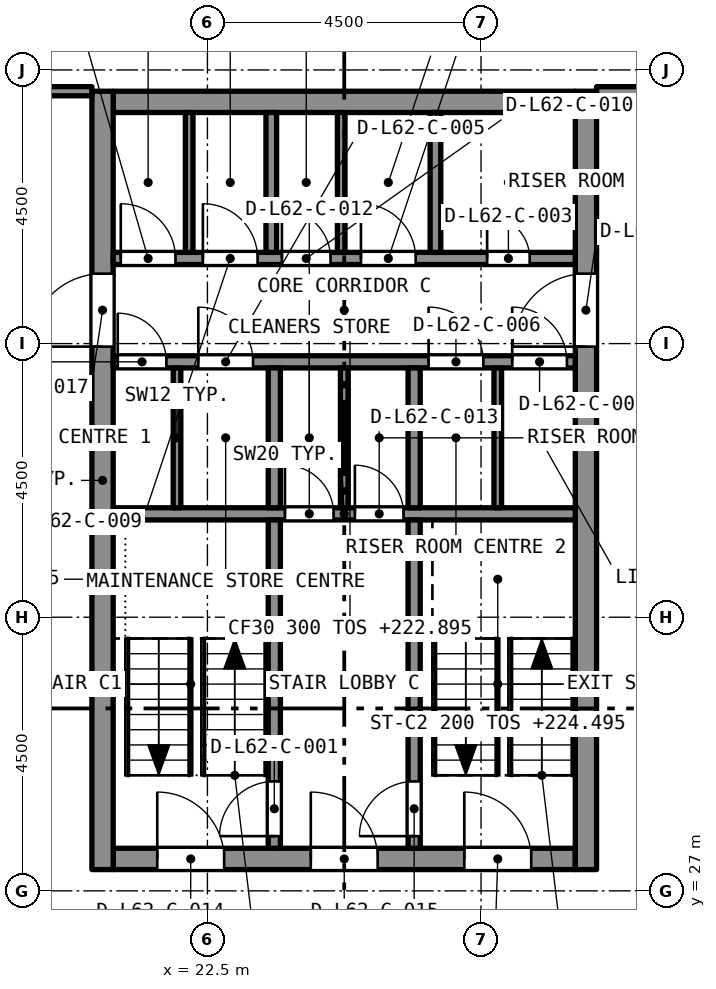
"""IFC4 building model, lengths in metres.
Left out: names, types, materials, properties, quantities, classifications, styles, units other than length and angle.
Written with IfcOpenShell. Run it as: python <this file> out.ifc"""

import sys

from ifc_helpers import new_model, si_unit, direction, frame, frame_2d, origin, place, context, subcontext, project, spatial, rectangle, extrude, element, fill, save


model = new_model("IFC4")
c1 = context("Model", 3, precision=1e-05, world=origin(), true_north=direction((0.0, 1.0)))
c2 = subcontext(c1, "Body", "Model", "MODEL_VIEW")
j1 = project(units=[si_unit("LENGTHUNIT", "METRE"), si_unit("PLANEANGLEUNIT", "RADIAN")], contexts=[c1])
p1 = place(None, origin())
s1 = spatial("IfcSite", under=j1, at=p1, CompositionType="ELEMENT")
p2 = place(p1, origin())
s2 = spatial("IfcBuilding", under=s1, at=p2, CompositionType="ELEMENT")
p3 = place(p2, frame((0.0, 0.0, 222.895)))
s3 = spatial("IfcBuildingStorey", under=s2, at=p3, CompositionType="ELEMENT", Elevation=222.895)
p4 = place(p3, frame((20.95, 27.525, 0.0), z_axis=(0.0, 0.0, 1.0), x_axis=(1.0, 0.0, 0.0)))
e1 = element("IfcWall", 1, at=p4, inside=s3, PredefinedType="SOLIDWALL", context=c2, shape_type="SweptSolid", body=[
    extrude(rectangle(XDim=7.6, YDim=0.35, at=frame_2d((3.8, 0.0))), origin(), (0.0, 0.0, 1.0), 3.2),
])
p5 = place(p4, frame((0.725, 0.0, 0.0)))
e2 = element("IfcOpeningElement", 2, at=p5, cuts=e1, PredefinedType="OPENING", context=c2, shape_type="SweptSolid", body=[
    extrude(rectangle(XDim=1.1, YDim=2.1, at=frame_2d((0.55, 1.05))), frame((0.0, 0.185, 0.0), z_axis=(0.0, -1.0, 0.0), x_axis=(1.0, 0.0, 0.0)), (0.0, 0.0, 1.0), 0.37),
])
p6 = place(p4, frame((3.25, 0.0, 0.0)))
e3 = element("IfcOpeningElement", 3, at=p6, cuts=e1, PredefinedType="OPENING", context=c2, shape_type="SweptSolid", body=[
    extrude(rectangle(XDim=1.1, YDim=2.1, at=frame_2d((0.55, 1.05))), frame((0.0, 0.185, 0.0), z_axis=(0.0, -1.0, 0.0), x_axis=(1.0, 0.0, 0.0)), (0.0, 0.0, 1.0), 0.37),
])
p7 = place(p4, frame((5.775, 0.0, 0.0)))
e4 = element("IfcOpeningElement", 4, at=p7, cuts=e1, PredefinedType="OPENING", context=c2, shape_type="SweptSolid", body=[
    extrude(rectangle(XDim=1.1, YDim=2.1, at=frame_2d((0.55, 1.05))), frame((0.0, 0.185, 0.0), z_axis=(0.0, -1.0, 0.0), x_axis=(1.0, 0.0, 0.0)), (0.0, 0.0, 1.0), 0.37),
])
p8 = place(p3, frame((20.95, 39.975, 0.0), z_axis=(0.0, 0.0, 1.0), x_axis=(1.0, 0.0, 0.0)))
e5 = element("IfcWall", 5, at=p8, inside=s3, PredefinedType="SOLIDWALL", context=c2, shape_type="SweptSolid", body=[
    extrude(rectangle(XDim=7.6, YDim=0.35, at=frame_2d((3.8, 0.0))), origin(), (0.0, 0.0, 1.0), 3.2),
])
p9 = place(p3, frame((20.775, 27.35, 0.0), z_axis=(0.0, 0.0, 1.0), x_axis=(0.0, 1.0, 0.0)))
e6 = element("IfcWall", 6, at=p9, inside=s3, PredefinedType="SOLIDWALL", context=c2, shape_type="SweptSolid", body=[
    extrude(rectangle(XDim=12.8, YDim=0.35, at=frame_2d((6.4, 0.0))), origin(), (0.0, 0.0, 1.0), 3.2),
])
p10 = place(p9, frame((8.6, 0.0, 0.0)))
e7 = element("IfcOpeningElement", 7, at=p10, cuts=e6, PredefinedType="OPENING", context=c2, shape_type="SweptSolid", body=[
    extrude(rectangle(XDim=1.2, YDim=2.1, at=frame_2d((0.6, 1.05))), frame((0.0, 0.185, 0.0), z_axis=(0.0, -1.0, 0.0), x_axis=(1.0, 0.0, 0.0)), (0.0, 0.0, 1.0), 0.37),
])
p11 = place(p3, frame((28.725, 27.35, 0.0), z_axis=(0.0, 0.0, 1.0), x_axis=(0.0, 1.0, 0.0)))
e8 = element("IfcWall", 8, at=p11, inside=s3, PredefinedType="SOLIDWALL", context=c2, shape_type="SweptSolid", body=[
    extrude(rectangle(XDim=12.8, YDim=0.35, at=frame_2d((6.4, 0.0))), origin(), (0.0, 0.0, 1.0), 3.2),
])
p12 = place(p11, frame((8.6, 0.0, 0.0)))
e9 = element("IfcOpeningElement", 9, at=p12, cuts=e8, PredefinedType="OPENING", context=c2, shape_type="SweptSolid", body=[
    extrude(rectangle(XDim=1.2, YDim=2.1, at=frame_2d((0.6, 1.05))), frame((0.0, 0.185, 0.0), z_axis=(0.0, -1.0, 0.0), x_axis=(1.0, 0.0, 0.0)), (0.0, 0.0, 1.0), 0.37),
])
p13 = place(p3, frame((18.4, 40.15, 0.0), z_axis=(0.0, 0.0, 1.0), x_axis=(1.0, 0.0, 0.0)))
e10 = element("IfcWall", 10, at=p13, inside=s3, PredefinedType="PARTITIONING", context=c2, shape_type="SweptSolid", body=[
    extrude(rectangle(XDim=2.2, YDim=0.15, at=frame_2d((1.1, 0.0))), origin(), (0.0, 0.0, 1.0), 2.75),
])
p14 = place(p13, frame((0.2, 0.0, 0.0)))
e11 = element("IfcOpeningElement", 11, at=p14, cuts=e10, PredefinedType="OPENING", context=c2, shape_type="SweptSolid", body=[
    extrude(rectangle(XDim=1.0, YDim=2.1, at=frame_2d((0.5, 1.05))), frame((0.0, 0.085, 0.0), z_axis=(0.0, -1.0, 0.0), x_axis=(1.0, 0.0, 0.0)), (0.0, 0.0, 1.0), 0.17),
])
p15 = place(p3, frame((28.9, 40.15, 0.0), z_axis=(0.0, 0.0, 1.0), x_axis=(1.0, 0.0, 0.0)))
e12 = element("IfcWall", 12, at=p15, inside=s3, PredefinedType="PARTITIONING", context=c2, shape_type="SweptSolid", body=[
    extrude(rectangle(XDim=2.2, YDim=0.15, at=frame_2d((1.1, 0.0))), origin(), (0.0, 0.0, 1.0), 2.75),
])
p16 = place(p3, frame((20.95, 33.2, 0.0), z_axis=(0.0, 0.0, 1.0), x_axis=(1.0, 0.0, 0.0)))
e13 = element("IfcWall", 13, at=p16, inside=s3, PredefinedType="SOLIDWALL", context=c2, shape_type="SweptSolid", body=[
    extrude(rectangle(XDim=7.6, YDim=0.2, at=frame_2d((3.8, 0.0))), origin(), (0.0, 0.0, 1.0), 2.9),
])
p17 = place(p16, frame((2.825, 0.0, 0.0)))
e14 = element("IfcOpeningElement", 14, at=p17, cuts=e13, PredefinedType="OPENING", context=c2, shape_type="SweptSolid", body=[
    extrude(rectangle(XDim=0.8, YDim=2.1, at=frame_2d((0.4, 1.05))), frame((0.0, 0.11, 0.0), z_axis=(0.0, -1.0, 0.0), x_axis=(1.0, 0.0, 0.0)), (0.0, 0.0, 1.0), 0.22),
])
p18 = place(p16, frame((3.975, 0.0, 0.0)))
e15 = element("IfcOpeningElement", 15, at=p18, cuts=e13, PredefinedType="OPENING", context=c2, shape_type="SweptSolid", body=[
    extrude(rectangle(XDim=0.8, YDim=2.1, at=frame_2d((0.4, 1.05))), frame((0.0, 0.11, 0.0), z_axis=(0.0, -1.0, 0.0), x_axis=(1.0, 0.0, 0.0)), (0.0, 0.0, 1.0), 0.22),
])
p19 = place(p3, frame((20.95, 35.7, 0.0), z_axis=(0.0, 0.0, 1.0), x_axis=(1.0, 0.0, 0.0)))
e16 = element("IfcWall", 16, at=p19, inside=s3, PredefinedType="SOLIDWALL", context=c2, shape_type="SweptSolid", body=[
    extrude(rectangle(XDim=7.6, YDim=0.2, at=frame_2d((3.8, 0.0))), origin(), (0.0, 0.0, 1.0), 2.9),
])
p20 = place(p19, frame((0.075, 0.0, 0.0)))
e17 = element("IfcOpeningElement", 17, at=p20, cuts=e16, PredefinedType="OPENING", context=c2, shape_type="SweptSolid", body=[
    extrude(rectangle(XDim=0.8, YDim=2.1, at=frame_2d((0.4, 1.05))), frame((0.0, 0.11, 0.0), z_axis=(0.0, -1.0, 0.0), x_axis=(1.0, 0.0, 0.0)), (0.0, 0.0, 1.0), 0.22),
])
p21 = place(p19, frame((1.4, 0.0, 0.0)))
e18 = element("IfcOpeningElement", 18, at=p21, cuts=e16, PredefinedType="OPENING", context=c2, shape_type="SweptSolid", body=[
    extrude(rectangle(XDim=0.9, YDim=2.1, at=frame_2d((0.45, 1.05))), frame((0.0, 0.11, 0.0), z_axis=(0.0, -1.0, 0.0), x_axis=(1.0, 0.0, 0.0)), (0.0, 0.0, 1.0), 0.22),
])
p22 = place(p19, frame((5.188, 0.0, 0.0)))
e19 = element("IfcOpeningElement", 19, at=p22, cuts=e16, PredefinedType="OPENING", context=c2, shape_type="SweptSolid", body=[
    extrude(rectangle(XDim=0.9, YDim=2.1, at=frame_2d((0.45, 1.05))), frame((0.0, 0.11, 0.0), z_axis=(0.0, -1.0, 0.0), x_axis=(1.0, 0.0, 0.0)), (0.0, 0.0, 1.0), 0.22),
])
p23 = place(p19, frame((6.562, 0.0, 0.0)))
e20 = element("IfcOpeningElement", 20, at=p23, cuts=e16, PredefinedType="OPENING", context=c2, shape_type="SweptSolid", body=[
    extrude(rectangle(XDim=0.9, YDim=2.1, at=frame_2d((0.45, 1.05))), frame((0.0, 0.11, 0.0), z_axis=(0.0, -1.0, 0.0), x_axis=(1.0, 0.0, 0.0)), (0.0, 0.0, 1.0), 0.22),
])
p24 = place(p3, frame((20.95, 37.4, 0.0), z_axis=(0.0, 0.0, 1.0), x_axis=(1.0, 0.0, 0.0)))
e21 = element("IfcWall", 21, at=p24, inside=s3, PredefinedType="SOLIDWALL", context=c2, shape_type="SweptSolid", body=[
    extrude(rectangle(XDim=7.6, YDim=0.2, at=frame_2d((3.8, 0.0))), origin(), (0.0, 0.0, 1.0), 2.9),
])
p25 = place(p24, frame((6.15, 0.0, 0.0)))
e22 = element("IfcOpeningElement", 22, at=p25, cuts=e21, PredefinedType="OPENING", context=c2, shape_type="SweptSolid", body=[
    extrude(rectangle(XDim=0.7, YDim=2.1, at=frame_2d((0.35, 1.05))), frame((0.0, 0.11, 0.0), z_axis=(0.0, -1.0, 0.0), x_axis=(1.0, 0.0, 0.0)), (0.0, 0.0, 1.0), 0.22),
])
p26 = place(p24, frame((0.125, 0.0, 0.0)))
e23 = element("IfcOpeningElement", 23, at=p26, cuts=e21, PredefinedType="OPENING", context=c2, shape_type="SweptSolid", body=[
    extrude(rectangle(XDim=0.9, YDim=2.1, at=frame_2d((0.45, 1.05))), frame((0.0, 0.11, 0.0), z_axis=(0.0, -1.0, 0.0), x_axis=(1.0, 0.0, 0.0)), (0.0, 0.0, 1.0), 0.22),
])
p27 = place(p24, frame((1.475, 0.0, 0.0)))
e24 = element("IfcOpeningElement", 24, at=p27, cuts=e21, PredefinedType="OPENING", context=c2, shape_type="SweptSolid", body=[
    extrude(rectangle(XDim=0.9, YDim=2.1, at=frame_2d((0.45, 1.05))), frame((0.0, 0.11, 0.0), z_axis=(0.0, -1.0, 0.0), x_axis=(1.0, 0.0, 0.0)), (0.0, 0.0, 1.0), 0.22),
])
p28 = place(p24, frame((2.775, 0.0, 0.0)))
e25 = element("IfcOpeningElement", 25, at=p28, cuts=e21, PredefinedType="OPENING", context=c2, shape_type="SweptSolid", body=[
    extrude(rectangle(XDim=0.8, YDim=2.1, at=frame_2d((0.4, 1.05))), frame((0.0, 0.11, 0.0), z_axis=(0.0, -1.0, 0.0), x_axis=(1.0, 0.0, 0.0)), (0.0, 0.0, 1.0), 0.22),
])
p29 = place(p24, frame((4.075, 0.0, 0.0)))
e26 = element("IfcOpeningElement", 26, at=p29, cuts=e21, PredefinedType="OPENING", context=c2, shape_type="SweptSolid", body=[
    extrude(rectangle(XDim=0.9, YDim=2.1, at=frame_2d((0.45, 1.05))), frame((0.0, 0.11, 0.0), z_axis=(0.0, -1.0, 0.0), x_axis=(1.0, 0.0, 0.0)), (0.0, 0.0, 1.0), 0.22),
])
p30 = place(p3, frame((23.6, 27.7, 0.0), z_axis=(0.0, 0.0, 1.0), x_axis=(0.0, 1.0, 0.0)))
e27 = element("IfcWall", 27, at=p30, inside=s3, PredefinedType="SOLIDWALL", context=c2, shape_type="SweptSolid", body=[
    extrude(rectangle(XDim=5.4, YDim=0.2, at=frame_2d((2.7, 0.0))), origin(), (0.0, 0.0, 1.0), 2.9),
])
p31 = place(p30, frame((0.2, 0.0, 0.0)))
e28 = element("IfcOpeningElement", 28, at=p31, cuts=e27, PredefinedType="OPENING", context=c2, shape_type="SweptSolid", body=[
    extrude(rectangle(XDim=0.9, YDim=2.1, at=frame_2d((0.45, 1.05))), frame((0.0, 0.11, 0.0), z_axis=(0.0, -1.0, 0.0), x_axis=(1.0, 0.0, 0.0)), (0.0, 0.0, 1.0), 0.22),
])
p32 = place(p3, frame((25.9, 27.7, 0.0), z_axis=(0.0, 0.0, 1.0), x_axis=(0.0, 1.0, 0.0)))
e29 = element("IfcWall", 29, at=p32, inside=s3, PredefinedType="SOLIDWALL", context=c2, shape_type="SweptSolid", body=[
    extrude(rectangle(XDim=5.4, YDim=0.2, at=frame_2d((2.7, 0.0))), origin(), (0.0, 0.0, 1.0), 2.9),
])
p33 = place(p32, frame((0.2, 0.0, 0.0)))
e30 = element("IfcOpeningElement", 30, at=p33, cuts=e29, PredefinedType="OPENING", context=c2, shape_type="SweptSolid", body=[
    extrude(rectangle(XDim=0.9, YDim=2.1, at=frame_2d((0.45, 1.05))), frame((0.0, 0.11, 0.0), z_axis=(0.0, -1.0, 0.0), x_axis=(1.0, 0.0, 0.0)), (0.0, 0.0, 1.0), 0.22),
])
for number, where, z_axis, x_axis in (
    (31, (23.6, 33.3, 0.0), (0.0, 0.0, 1.0), (0.0, 1.0, 0.0)),
    (32, (25.9, 33.3, 0.0), (0.0, 0.0, 1.0), (0.0, 1.0, 0.0)),
):
    element("IfcWall", number, at=place(p3, frame(where, z_axis=z_axis, x_axis=x_axis)), inside=s3, PredefinedType="SOLIDWALL", context=c2, shape_type="SweptSolid", body=[
        extrude(rectangle(XDim=2.3, YDim=0.2, at=frame_2d((1.15, 0.0))), origin(), (0.0, 0.0, 1.0), 2.9),
    ])
for number, where, z_axis, x_axis in (
    (33, (23.55, 37.5, 0.0), (0.0, 0.0, 1.0), (0.0, 1.0, 0.0)),
    (34, (26.25, 37.5, 0.0), (0.0, 0.0, 1.0), (0.0, 1.0, 0.0)),
):
    element("IfcWall", number, at=place(p3, frame(where, z_axis=z_axis, x_axis=x_axis)), inside=s3, PredefinedType="SOLIDWALL", context=c2, shape_type="SweptSolid", body=[
        extrude(rectangle(XDim=2.3, YDim=0.175, at=frame_2d((1.15, 0.0))), origin(), (0.0, 0.0, 1.0), 2.9),
    ])
for number, where, z_axis, x_axis in (
    (35, (22.0, 33.3, 0.0), (0.0, 0.0, 1.0), (0.0, 1.0, 0.0)),
    (36, (27.275, 33.3, 0.0), (0.0, 0.0, 1.0), (0.0, 1.0, 0.0)),
    (37, (22.2, 37.5, 0.0), (0.0, 0.0, 1.0), (0.0, 1.0, 0.0)),
    (38, (24.7, 37.5, 0.0), (0.0, 0.0, 1.0), (0.0, 1.0, 0.0)),
    (39, (24.75, 33.3, 0.0), (0.0, 0.0, 1.0), (0.0, 1.0, 0.0)),
):
    element("IfcWall", number, at=place(p3, frame(where, z_axis=z_axis, x_axis=x_axis)), inside=s3, PredefinedType="PARTITIONING", context=c2, shape_type="SweptSolid", body=[
        extrude(rectangle(XDim=2.3, YDim=0.125, at=frame_2d((1.15, 0.0))), origin(), (0.0, 0.0, 1.0), 2.9),
    ])
p34 = place(p31, origin())
e40 = element("IfcDoor", 40, at=p34, inside=s3, OperationType="SINGLE_SWING_LEFT", PredefinedType="DOOR", context=c2, shape_type="SweptSolid", body=[
    extrude(rectangle(XDim=0.9, YDim=2.1, at=frame_2d((0.45, 1.05))), frame((0.0, 0.025, 0.0), z_axis=(0.0, -1.0, 0.0), x_axis=(1.0, 0.0, 0.0)), (0.0, 0.0, 1.0), 0.05),
])
fill(e28, e40)
p35 = place(p33, origin())
e41 = element("IfcDoor", 41, at=p35, inside=s3, OperationType="SINGLE_SWING_LEFT", PredefinedType="DOOR", context=c2, shape_type="SweptSolid", body=[
    extrude(rectangle(XDim=0.9, YDim=2.1, at=frame_2d((0.45, 1.05))), frame((0.0, 0.025, 0.0), z_axis=(0.0, -1.0, 0.0), x_axis=(1.0, 0.0, 0.0)), (0.0, 0.0, 1.0), 0.05),
])
fill(e30, e41)
p36 = place(p25, origin())
e42 = element("IfcDoor", 42, at=p36, inside=s3, OperationType="SINGLE_SWING_LEFT", PredefinedType="DOOR", context=c2, shape_type="SweptSolid", body=[
    extrude(rectangle(XDim=0.7, YDim=2.1, at=frame_2d((0.35, 1.05))), frame((0.0, 0.025, 0.0), z_axis=(0.0, -1.0, 0.0), x_axis=(1.0, 0.0, 0.0)), (0.0, 0.0, 1.0), 0.05),
])
fill(e22, e42)
p37 = place(p20, origin())
e43 = element("IfcDoor", 43, at=p37, inside=s3, OperationType="SINGLE_SWING_LEFT", PredefinedType="DOOR", context=c2, shape_type="SweptSolid", body=[
    extrude(rectangle(XDim=0.8, YDim=2.1, at=frame_2d((0.4, 1.05))), frame((0.0, 0.025, 0.0), z_axis=(0.0, -1.0, 0.0), x_axis=(1.0, 0.0, 0.0)), (0.0, 0.0, 1.0), 0.05),
])
fill(e17, e43)
p38 = place(p21, origin())
e44 = element("IfcDoor", 44, at=p38, inside=s3, OperationType="SINGLE_SWING_LEFT", PredefinedType="DOOR", context=c2, shape_type="SweptSolid", body=[
    extrude(rectangle(XDim=0.9, YDim=2.1, at=frame_2d((0.45, 1.05))), frame((0.0, 0.025, 0.0), z_axis=(0.0, -1.0, 0.0), x_axis=(1.0, 0.0, 0.0)), (0.0, 0.0, 1.0), 0.05),
])
fill(e18, e44)
p39 = place(p22, origin())
e45 = element("IfcDoor", 45, at=p39, inside=s3, OperationType="SINGLE_SWING_LEFT", PredefinedType="DOOR", context=c2, shape_type="SweptSolid", body=[
    extrude(rectangle(XDim=0.9, YDim=2.1, at=frame_2d((0.45, 1.05))), frame((0.0, 0.025, 0.0), z_axis=(0.0, -1.0, 0.0), x_axis=(1.0, 0.0, 0.0)), (0.0, 0.0, 1.0), 0.05),
])
fill(e19, e45)
p40 = place(p23, origin())
e46 = element("IfcDoor", 46, at=p40, inside=s3, OperationType="SINGLE_SWING_LEFT", PredefinedType="DOOR", context=c2, shape_type="SweptSolid", body=[
    extrude(rectangle(XDim=0.9, YDim=2.1, at=frame_2d((0.45, 1.05))), frame((0.0, 0.025, 0.0), z_axis=(0.0, -1.0, 0.0), x_axis=(1.0, 0.0, 0.0)), (0.0, 0.0, 1.0), 0.05),
])
fill(e20, e46)
p41 = place(p26, origin())
e47 = element("IfcDoor", 47, at=p41, inside=s3, OperationType="SINGLE_SWING_LEFT", PredefinedType="DOOR", context=c2, shape_type="SweptSolid", body=[
    extrude(rectangle(XDim=0.9, YDim=2.1, at=frame_2d((0.45, 1.05))), frame((0.0, 0.025, 0.0), z_axis=(0.0, -1.0, 0.0), x_axis=(1.0, 0.0, 0.0)), (0.0, 0.0, 1.0), 0.05),
])
fill(e23, e47)
p42 = place(p27, origin())
e48 = element("IfcDoor", 48, at=p42, inside=s3, OperationType="SINGLE_SWING_LEFT", PredefinedType="DOOR", context=c2, shape_type="SweptSolid", body=[
    extrude(rectangle(XDim=0.9, YDim=2.1, at=frame_2d((0.45, 1.05))), frame((0.0, 0.025, 0.0), z_axis=(0.0, -1.0, 0.0), x_axis=(1.0, 0.0, 0.0)), (0.0, 0.0, 1.0), 0.05),
])
fill(e24, e48)
p43 = place(p28, origin())
e49 = element("IfcDoor", 49, at=p43, inside=s3, OperationType="SINGLE_SWING_LEFT", PredefinedType="DOOR", context=c2, shape_type="SweptSolid", body=[
    extrude(rectangle(XDim=0.8, YDim=2.1, at=frame_2d((0.4, 1.05))), frame((0.0, 0.025, 0.0), z_axis=(0.0, -1.0, 0.0), x_axis=(1.0, 0.0, 0.0)), (0.0, 0.0, 1.0), 0.05),
])
fill(e25, e49)
p44 = place(p29, origin())
e50 = element("IfcDoor", 50, at=p44, inside=s3, OperationType="SINGLE_SWING_LEFT", PredefinedType="DOOR", context=c2, shape_type="SweptSolid", body=[
    extrude(rectangle(XDim=0.9, YDim=2.1, at=frame_2d((0.45, 1.05))), frame((0.0, 0.025, 0.0), z_axis=(0.0, -1.0, 0.0), x_axis=(1.0, 0.0, 0.0)), (0.0, 0.0, 1.0), 0.05),
])
fill(e26, e50)
p45 = place(p17, origin())
e51 = element("IfcDoor", 51, at=p45, inside=s3, OperationType="SINGLE_SWING_LEFT", PredefinedType="DOOR", context=c2, shape_type="SweptSolid", body=[
    extrude(rectangle(XDim=0.8, YDim=2.1, at=frame_2d((0.4, 1.05))), frame((0.0, 0.025, 0.0), z_axis=(0.0, -1.0, 0.0), x_axis=(1.0, 0.0, 0.0)), (0.0, 0.0, 1.0), 0.05),
])
fill(e14, e51)
p46 = place(p18, origin())
e52 = element("IfcDoor", 52, at=p46, inside=s3, OperationType="SINGLE_SWING_LEFT", PredefinedType="DOOR", context=c2, shape_type="SweptSolid", body=[
    extrude(rectangle(XDim=0.8, YDim=2.1, at=frame_2d((0.4, 1.05))), frame((0.0, 0.025, 0.0), z_axis=(0.0, -1.0, 0.0), x_axis=(1.0, 0.0, 0.0)), (0.0, 0.0, 1.0), 0.05),
])
fill(e15, e52)
p47 = place(p5, origin())
e53 = element("IfcDoor", 53, at=p47, inside=s3, OperationType="SINGLE_SWING_LEFT", PredefinedType="DOOR", context=c2, shape_type="SweptSolid", body=[
    extrude(rectangle(XDim=1.1, YDim=2.1, at=frame_2d((0.55, 1.05))), frame((0.0, 0.025, 0.0), z_axis=(0.0, -1.0, 0.0), x_axis=(1.0, 0.0, 0.0)), (0.0, 0.0, 1.0), 0.05),
])
fill(e2, e53)
p48 = place(p6, origin())
e54 = element("IfcDoor", 54, at=p48, inside=s3, OperationType="SINGLE_SWING_LEFT", PredefinedType="DOOR", context=c2, shape_type="SweptSolid", body=[
    extrude(rectangle(XDim=1.1, YDim=2.1, at=frame_2d((0.55, 1.05))), frame((0.0, 0.025, 0.0), z_axis=(0.0, -1.0, 0.0), x_axis=(1.0, 0.0, 0.0)), (0.0, 0.0, 1.0), 0.05),
])
fill(e3, e54)
p49 = place(p7, origin())
e55 = element("IfcDoor", 55, at=p49, inside=s3, OperationType="SINGLE_SWING_LEFT", PredefinedType="DOOR", context=c2, shape_type="SweptSolid", body=[
    extrude(rectangle(XDim=1.1, YDim=2.1, at=frame_2d((0.55, 1.05))), frame((0.0, 0.025, 0.0), z_axis=(0.0, -1.0, 0.0), x_axis=(1.0, 0.0, 0.0)), (0.0, 0.0, 1.0), 0.05),
])
fill(e4, e55)
p50 = place(p10, origin())
e56 = element("IfcDoor", 56, at=p50, inside=s3, OperationType="SINGLE_SWING_LEFT", PredefinedType="DOOR", context=c2, shape_type="SweptSolid", body=[
    extrude(rectangle(XDim=1.2, YDim=2.1, at=frame_2d((0.6, 1.05))), frame((0.0, 0.025, 0.0), z_axis=(0.0, -1.0, 0.0), x_axis=(1.0, 0.0, 0.0)), (0.0, 0.0, 1.0), 0.05),
])
fill(e7, e56)
p51 = place(p12, origin())
e57 = element("IfcDoor", 57, at=p51, inside=s3, OperationType="SINGLE_SWING_LEFT", PredefinedType="DOOR", context=c2, shape_type="SweptSolid", body=[
    extrude(rectangle(XDim=1.2, YDim=2.1, at=frame_2d((0.6, 1.05))), frame((0.0, 0.025, 0.0), z_axis=(0.0, -1.0, 0.0), x_axis=(1.0, 0.0, 0.0)), (0.0, 0.0, 1.0), 0.05),
])
fill(e9, e57)
save(model, sys.argv[1])
